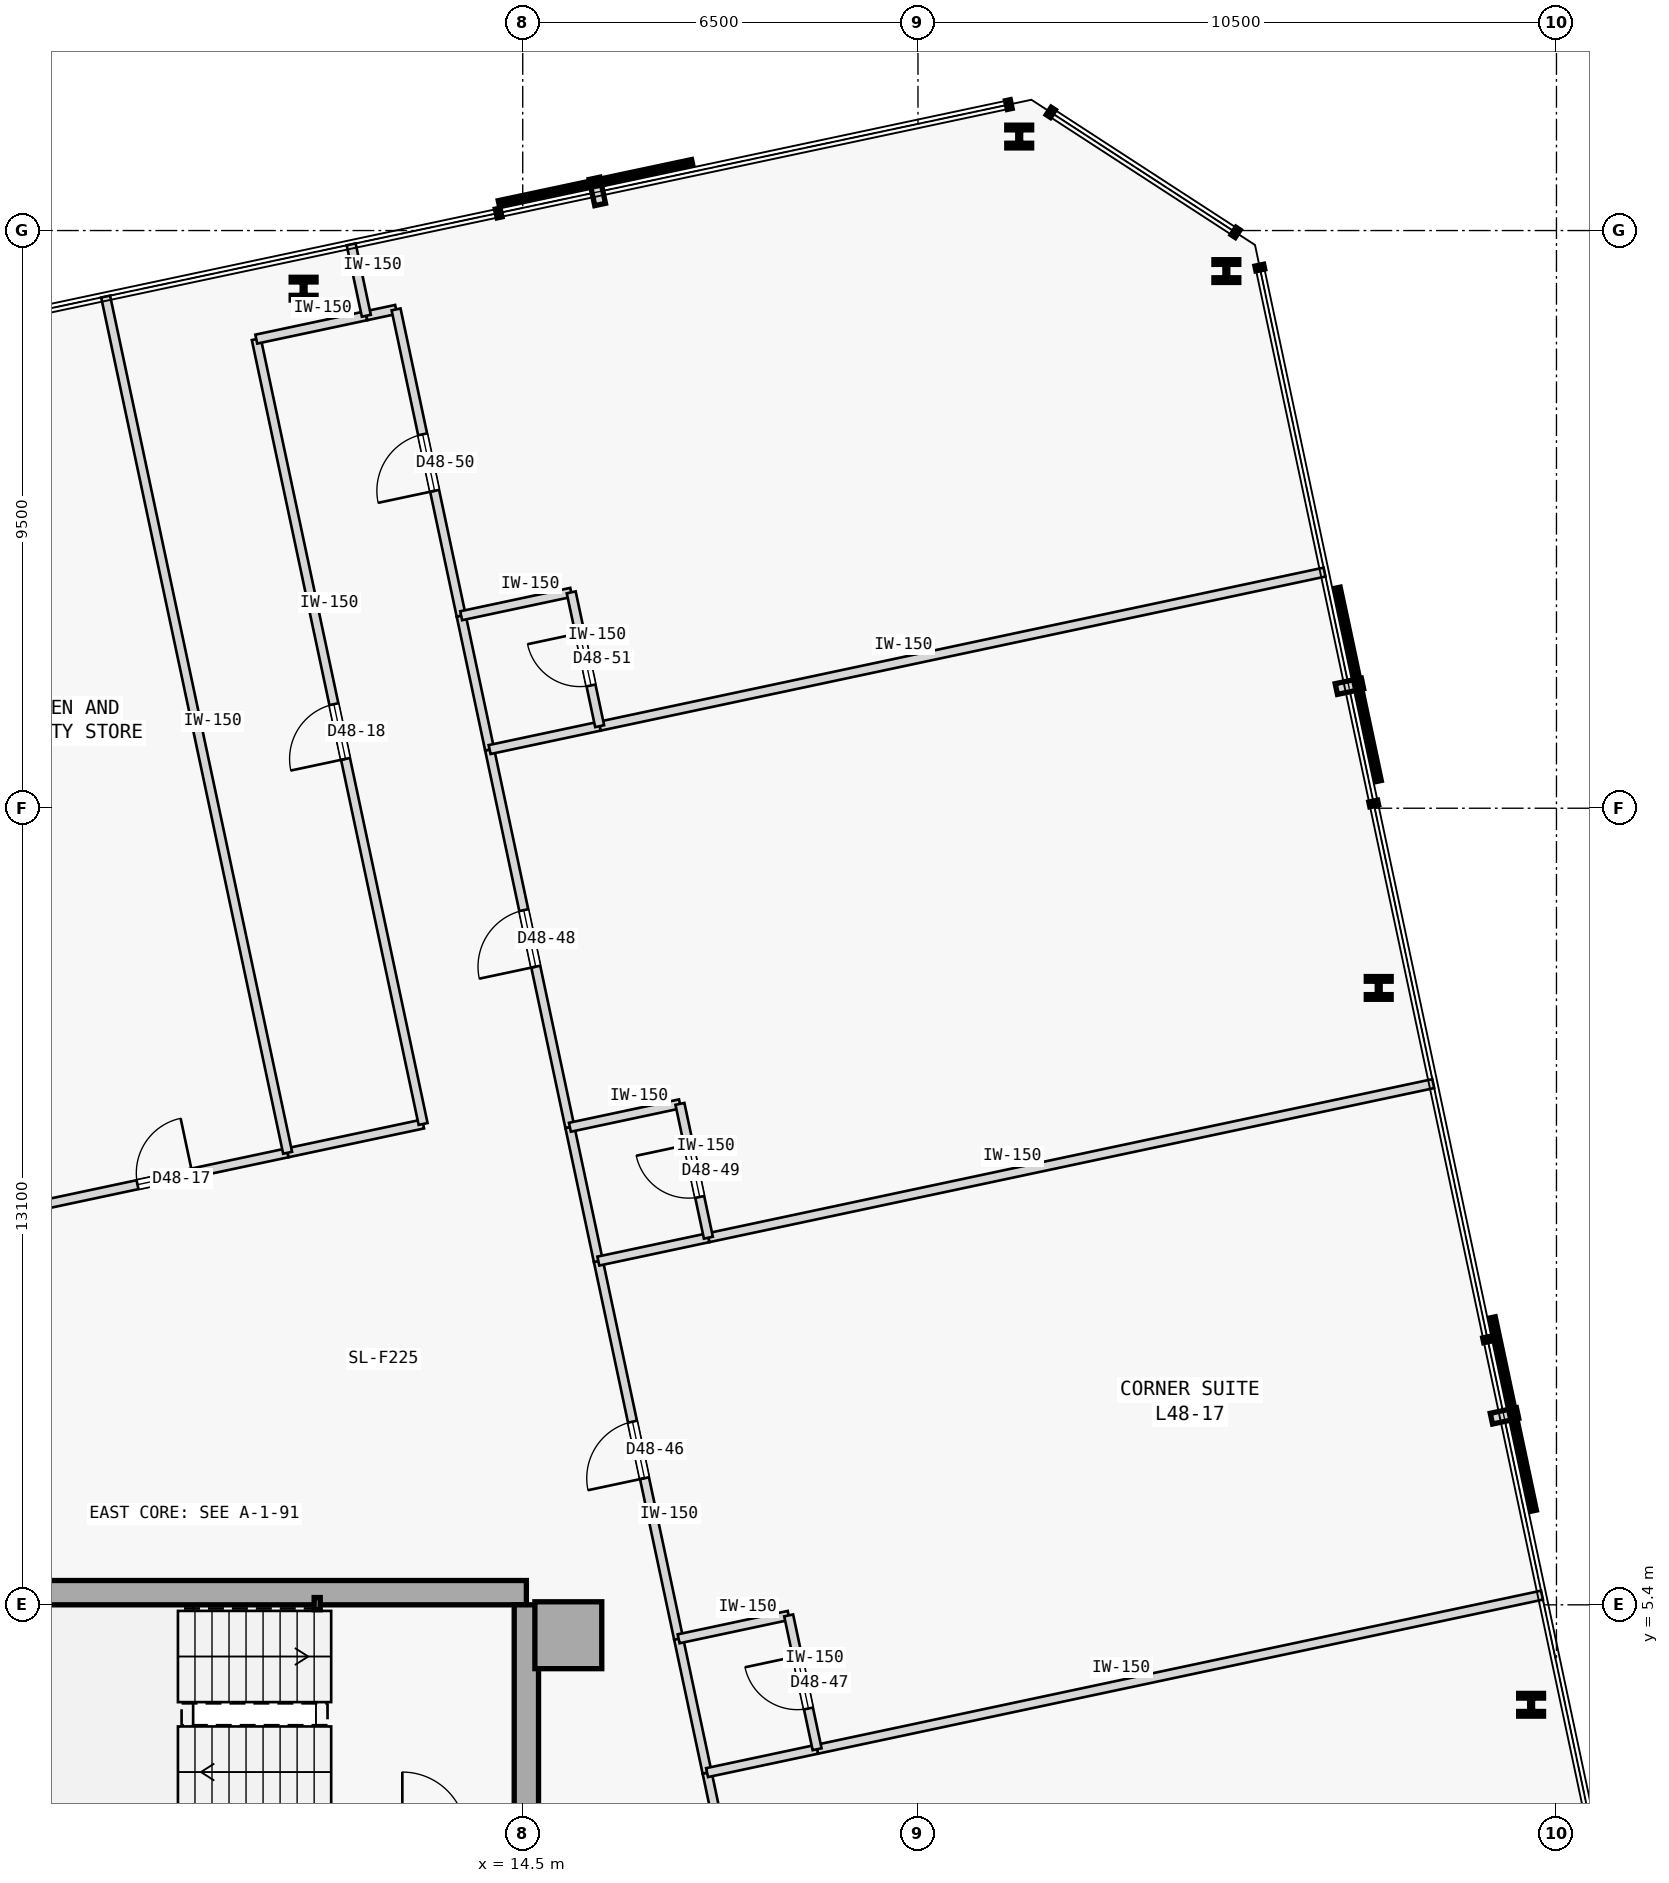
"""IFC4 building model, lengths in metres.
Left out: names, types, materials, properties, quantities, classifications, styles, units other than length and angle.
Written with IfcOpenShell. Run it as: python <this file> out.ifc"""

import sys

from ifc_helpers import new_model, si_unit, direction, frame, frame_2d, origin, origin_2d, place, context, subcontext, project, spatial, rectangle, hollow_rectangle, i_section, extrude, element, fill, save


model = new_model("IFC4")
c1 = context("Model", 3, precision=1e-05, world=origin(), true_north=direction((0.0, 1.0)))
c2 = subcontext(c1, "Body", "Model", "MODEL_VIEW")
j1 = project(units=[si_unit("LENGTHUNIT", "METRE"), si_unit("PLANEANGLEUNIT", "RADIAN")], contexts=[c1])
p1 = place(None, origin())
s1 = spatial("IfcSite", under=j1, at=p1, CompositionType="ELEMENT")
p2 = place(p1, origin())
s2 = spatial("IfcBuilding", under=s1, at=p2, CompositionType="ELEMENT")
p3 = place(p2, frame((0.0, 0.0, 185.4)))
s3 = spatial("IfcBuildingStorey", under=s2, at=p3, CompositionType="ELEMENT", Elevation=185.4)
p4 = place(p3, frame((15.25, 4.9, 0.0), z_axis=(0.0, 0.0, 1.0), x_axis=(1.0, 0.0, 0.0)))
e1 = element("IfcColumn", 1, at=p4, inside=s3, PredefinedType="COLUMN", context=c2, shape_type="SweptSolid", body=[
    extrude(rectangle(XDim=1.1, YDim=1.1, at=origin_2d()), origin(), (0.0, 0.0, 1.0), 3.4),
])
p5 = place(p3, frame((3.15, 5.6, 0.0), z_axis=(0.0, 0.0, 1.0), x_axis=(1.0, 0.0, 0.0)))
e2 = element("IfcWall", 2, at=p5, inside=s3, PredefinedType="SHEAR", context=c2, shape_type="SweptSolid", body=[
    extrude(rectangle(XDim=11.41, YDim=0.4, at=frame_2d((5.705, 0.0))), origin(), (0.0, 0.0, 1.0), 3.175),
])
p6 = place(p3, frame((14.56, -5.4, 0.0), z_axis=(0.0, 0.0, 1.0), x_axis=(0.0, 1.0, 0.0)))
e3 = element("IfcWall", 3, at=p6, inside=s3, PredefinedType="SHEAR", context=c2, shape_type="SweptSolid", body=[
    extrude(rectangle(XDim=10.8, YDim=0.4, at=frame_2d((5.4, 0.0))), origin(), (0.0, 0.0, 1.0), 3.175),
])
p7 = place(p3, frame((11.12, 5.42, 0.0), z_axis=(0.0, 0.0, 1.0), x_axis=(1.0, 0.0, 0.0)))
e4 = element("IfcColumn", 4, at=p7, inside=s3, PredefinedType="COLUMN", context=c2, shape_type="SweptSolid", body=[
    extrude(hollow_rectangle(XDim=0.1, YDim=0.2, WallThickness=0.008, at=origin_2d()), origin(), (0.0, 0.0, 1.0), 3.4),
])
for number, where, z_axis, x_axis in (
    (5, (31.083, 3.756, 0.0), (0.0, 0.0, 1.0), (1.0, 0.0, 0.0)),
    (6, (28.577, 15.545, 0.0), (0.0, 0.0, 1.0), (1.0, 0.0, 0.0)),
    (7, (26.071, 27.333, 0.0), (0.0, 0.0, 1.0), (1.0, 0.0, 0.0)),
    (8, (22.665, 29.546, 0.0), (0.0, 0.0, 1.0), (1.0, 0.0, 0.0)),
    (9, (10.896, 27.044, 0.0), (0.0, 0.0, 1.0), (1.0, 0.0, 0.0)),
):
    element("IfcColumn", number, at=place(p3, frame(where, z_axis=z_axis, x_axis=x_axis)), inside=s3, PredefinedType="COLUMN", context=c2, shape_type="SweptSolid", body=[
        extrude(i_section(OverallWidth=0.409, OverallDepth=0.374, WebThickness=0.048, FlangeThickness=0.077, FilletRadius=0.015, at=origin_2d()), origin(), (0.0, 0.0, 1.0), 3.4),
    ])
p8 = place(p3, frame((6.597, 11.976, 0.0), z_axis=(0.0, 0.0, 1.0), x_axis=(0.978155092113, 0.207876443525, 0.0)))
e10 = element("IfcWall", 10, at=p8, inside=s3, PredefinedType="PARTITIONING", context=c2, shape_type="SweptSolid", body=[
    extrude(rectangle(XDim=4.127, YDim=0.15, at=frame_2d((2.063, 0.0))), origin(), (0.0, 0.0, 1.0), 3.175),
])
p9 = place(p8, frame((1.604, 0.0, 0.0)))
e11 = element("IfcOpeningElement", 11, at=p9, cuts=e10, PredefinedType="OPENING", context=c2, shape_type="SweptSolid", body=[
    extrude(rectangle(XDim=0.92, YDim=2.15, at=frame_2d((0.46, 1.075))), frame((0.0, 0.085, 0.0), z_axis=(0.0, -1.0, 0.0), x_axis=(1.0, 0.0, 0.0)), (0.0, 0.0, 1.0), 0.17),
])
p10 = place(p3, frame((10.634, 12.834, 0.0), z_axis=(0.0, 0.0, 1.0), x_axis=(0.978147682212, 0.207911307493, 0.0)))
e12 = element("IfcWall", 12, at=p10, inside=s3, PredefinedType="PARTITIONING", context=c2, shape_type="SweptSolid", body=[
    extrude(rectangle(XDim=2.278, YDim=0.15, at=frame_2d((1.139, 0.0))), origin(), (0.0, 0.0, 1.0), 3.175),
])
p11 = place(p3, frame((12.862, 13.308, 0.0), z_axis=(0.0, 0.0, 1.0), x_axis=(-0.207911421929, 0.978147657888, 0.0)))
e13 = element("IfcWall", 13, at=p11, inside=s3, PredefinedType="PARTITIONING", context=c2, shape_type="SweptSolid", body=[
    extrude(rectangle(XDim=13.195, YDim=0.15, at=frame_2d((6.598, 0.0))), origin(), (0.0, 0.0, 1.0), 3.175),
])
p12 = place(p11, frame((6.137, 0.0, 0.0)))
e14 = element("IfcOpeningElement", 14, at=p12, cuts=e13, PredefinedType="OPENING", context=c2, shape_type="SweptSolid", body=[
    extrude(rectangle(XDim=0.92, YDim=2.15, at=frame_2d((0.46, 1.075))), frame((0.0, 0.085, 0.0), z_axis=(0.0, -1.0, 0.0), x_axis=(1.0, 0.0, 0.0)), (0.0, 0.0, 1.0), 0.17),
])
p13 = place(p3, frame((10.118, 26.214, 0.0), z_axis=(0.0, 0.0, 1.0), x_axis=(0.978133353907, 0.20797870558, 0.0)))
e15 = element("IfcWall", 15, at=p13, inside=s3, PredefinedType="PARTITIONING", context=c2, shape_type="SweptSolid", body=[
    extrude(rectangle(XDim=1.85, YDim=0.15, at=frame_2d((0.925, 0.0))), origin(), (0.0, 0.0, 1.0), 3.175),
])
p14 = place(p3, frame((18.852, -3.571, 0.0), z_axis=(0.0, 0.0, 1.0), x_axis=(-0.207879907349, 0.978154355979, 0.0)))
e16 = element("IfcWall", 16, at=p14, inside=s3, PredefinedType="PARTITIONING", context=c2, shape_type="SweptSolid", body=[
    extrude(rectangle(XDim=6.35, YDim=0.15, at=frame_2d((3.175, 0.0))), origin(), (0.0, 0.0, 1.0), 3.175),
])
p15 = place(p14, frame((2.7, 0.0, 0.0)))
e17 = element("IfcOpeningElement", 17, at=p15, cuts=e16, PredefinedType="OPENING", context=c2, shape_type="SweptSolid", body=[
    extrude(rectangle(XDim=0.95, YDim=2.15, at=frame_2d((0.475, 1.075))), frame((0.0, 0.085, 0.0), z_axis=(0.0, -1.0, 0.0), x_axis=(1.0, 0.0, 0.0)), (0.0, 0.0, 1.0), 0.17),
])
p16 = place(p3, frame((17.064, 4.841, 0.0), z_axis=(0.0, 0.0, 1.0), x_axis=(-0.207924511115, 0.978144875608, 0.0)))
e18 = element("IfcWall", 18, at=p16, inside=s3, PredefinedType="PARTITIONING", context=c2, shape_type="SweptSolid", body=[
    extrude(rectangle(XDim=6.35, YDim=0.15, at=frame_2d((3.175, 0.0))), origin(), (0.0, 0.0, 1.0), 3.175),
])
p17 = place(p16, frame((2.7, 0.0, 0.0)))
e19 = element("IfcOpeningElement", 19, at=p17, cuts=e18, PredefinedType="OPENING", context=c2, shape_type="SweptSolid", body=[
    extrude(rectangle(XDim=0.95, YDim=2.15, at=frame_2d((0.475, 1.075))), frame((0.0, 0.085, 0.0), z_axis=(0.0, -1.0, 0.0), x_axis=(1.0, 0.0, 0.0)), (0.0, 0.0, 1.0), 0.17),
])
p18 = place(p3, frame((17.532, 2.641, 0.0), z_axis=(0.0, 0.0, 1.0), x_axis=(-0.207913264065, 0.978147266328, 0.0)))
e20 = element("IfcWall", 20, at=p18, inside=s3, PredefinedType="PARTITIONING", context=c2, shape_type="SweptSolid", body=[
    extrude(rectangle(XDim=2.25, YDim=0.15, at=frame_2d((1.125, 0.0))), origin(), (0.0, 0.0, 1.0), 3.175),
])
p19 = place(p3, frame((15.276, 13.253, 0.0), z_axis=(0.0, 0.0, 1.0), x_axis=(-0.207924511115, 0.978144875608, 0.0)))
e21 = element("IfcWall", 21, at=p19, inside=s3, PredefinedType="PARTITIONING", context=c2, shape_type="SweptSolid", body=[
    extrude(rectangle(XDim=6.35, YDim=0.15, at=frame_2d((3.175, 0.0))), origin(), (0.0, 0.0, 1.0), 3.175),
])
p20 = place(p19, frame((2.7, 0.0, 0.0)))
e22 = element("IfcOpeningElement", 22, at=p20, cuts=e21, PredefinedType="OPENING", context=c2, shape_type="SweptSolid", body=[
    extrude(rectangle(XDim=0.95, YDim=2.15, at=frame_2d((0.475, 1.075))), frame((0.0, 0.085, 0.0), z_axis=(0.0, -1.0, 0.0), x_axis=(1.0, 0.0, 0.0)), (0.0, 0.0, 1.0), 0.17),
])
p21 = place(p3, frame((15.744, 11.052, 0.0), z_axis=(0.0, 0.0, 1.0), x_axis=(-0.207891197838, 0.978151956427, 0.0)))
e23 = element("IfcWall", 23, at=p21, inside=s3, PredefinedType="PARTITIONING", context=c2, shape_type="SweptSolid", body=[
    extrude(rectangle(XDim=2.25, YDim=0.15, at=frame_2d((1.125, 0.0))), origin(), (0.0, 0.0, 1.0), 3.175),
])
p22 = place(p3, frame((11.928, 26.599, 0.0), z_axis=(0.0, 0.0, 1.0), x_axis=(0.97822210712, 0.207560856478, 0.0)))
e24 = element("IfcWall", 24, at=p22, inside=s3, PredefinedType="PARTITIONING", context=c2, shape_type="SweptSolid", body=[
    extrude(rectangle(XDim=0.5, YDim=0.15, at=frame_2d((0.25, 0.0))), origin(), (0.0, 0.0, 1.0), 3.175),
])
p23 = place(p3, frame((13.488, 21.666, 0.0), z_axis=(0.0, 0.0, 1.0), x_axis=(-0.207926226209, 0.978144511028, 0.0)))
e25 = element("IfcWall", 25, at=p23, inside=s3, PredefinedType="PARTITIONING", context=c2, shape_type="SweptSolid", body=[
    extrude(rectangle(XDim=5.15, YDim=0.15, at=frame_2d((2.575, 0.0))), origin(), (0.0, 0.0, 1.0), 3.175),
])
p24 = place(p23, frame((2.1, 0.0, 0.0)))
e26 = element("IfcOpeningElement", 26, at=p24, cuts=e25, PredefinedType="OPENING", context=c2, shape_type="SweptSolid", body=[
    extrude(rectangle(XDim=0.95, YDim=2.15, at=frame_2d((0.475, 1.075))), frame((0.0, 0.085, 0.0), z_axis=(0.0, -1.0, 0.0), x_axis=(1.0, 0.0, 0.0)), (0.0, 0.0, 1.0), 0.17),
])
p25 = place(p3, frame((13.956, 19.465, 0.0), z_axis=(0.0, 0.0, 1.0), x_axis=(-0.207891197838, 0.978151956427, 0.0)))
e27 = element("IfcWall", 27, at=p25, inside=s3, PredefinedType="PARTITIONING", context=c2, shape_type="SweptSolid", body=[
    extrude(rectangle(XDim=2.25, YDim=0.15, at=frame_2d((1.125, 0.0))), origin(), (0.0, 0.0, 1.0), 3.175),
])
p26 = place(p3, frame((10.634, 12.834, 0.0), z_axis=(0.0, 0.0, 1.0), x_axis=(-0.207911899531, 0.97814755637, 0.0)))
e28 = element("IfcWall", 28, at=p26, inside=s3, PredefinedType="PARTITIONING", context=c2, shape_type="SweptSolid", body=[
    extrude(rectangle(XDim=14.395, YDim=0.15, at=frame_2d((7.198, 0.0))), origin(), (0.0, 0.0, 1.0), 3.175),
])
p27 = place(p3, frame((11.928, 26.599, 0.0), z_axis=(0.0, 0.0, 1.0), x_axis=(-0.20795853359, 0.978137642823, 0.0)))
e29 = element("IfcWall", 29, at=p27, inside=s3, PredefinedType="PARTITIONING", context=c2, shape_type="SweptSolid", body=[
    extrude(rectangle(XDim=1.2, YDim=0.15, at=frame_2d((0.6, 0.0))), origin(), (0.0, 0.0, 1.0), 3.175),
])
p28 = place(p3, frame((19.341, 3.025, 0.0), z_axis=(0.0, 0.0, 1.0), x_axis=(0.97814556055, 0.207921288896, 0.0)))
e30 = element("IfcWall", 30, at=p28, inside=s3, PredefinedType="PARTITIONING", context=c2, shape_type="SweptSolid", body=[
    extrude(rectangle(XDim=12.187, YDim=0.15, at=frame_2d((6.094, 0.0))), origin(), (0.0, 0.0, 1.0), 3.175),
])
p29 = place(p3, frame((17.532, 2.641, 0.0), z_axis=(0.0, 0.0, 1.0), x_axis=(0.978160192495, 0.207852442415, 0.0)))
e31 = element("IfcWall", 31, at=p29, inside=s3, PredefinedType="PARTITIONING", context=c2, shape_type="SweptSolid", body=[
    extrude(rectangle(XDim=1.85, YDim=0.15, at=frame_2d((0.925, 0.0))), origin(), (0.0, 0.0, 1.0), 3.175),
])
p30 = place(p3, frame((17.064, 4.841, 0.0), z_axis=(0.0, 0.0, 1.0), x_axis=(0.978133353907, 0.20797870558, 0.0)))
e32 = element("IfcWall", 32, at=p30, inside=s3, PredefinedType="PARTITIONING", context=c2, shape_type="SweptSolid", body=[
    extrude(rectangle(XDim=1.85, YDim=0.15, at=frame_2d((0.925, 0.0))), origin(), (0.0, 0.0, 1.0), 3.175),
])
p31 = place(p3, frame((19.341, 3.025, 0.0), z_axis=(0.0, 0.0, 1.0), x_axis=(-0.207891197838, 0.978151956427, 0.0)))
e33 = element("IfcWall", 33, at=p31, inside=s3, PredefinedType="PARTITIONING", context=c2, shape_type="SweptSolid", body=[
    extrude(rectangle(XDim=2.25, YDim=0.15, at=frame_2d((1.125, 0.0))), origin(), (0.0, 0.0, 1.0), 3.175),
])
p32 = place(p31, frame((0.685, 0.0, 0.0)))
e34 = element("IfcOpeningElement", 34, at=p32, cuts=e33, PredefinedType="OPENING", context=c2, shape_type="SweptSolid", body=[
    extrude(rectangle(XDim=0.88, YDim=2.15, at=frame_2d((0.44, 1.075))), frame((0.0, 0.085, 0.0), z_axis=(0.0, -1.0, 0.0), x_axis=(1.0, 0.0, 0.0)), (0.0, 0.0, 1.0), 0.17),
])
p33 = place(p3, frame((17.553, 11.437, 0.0), z_axis=(0.0, 0.0, 1.0), x_axis=(0.97814556055, 0.207921288896, 0.0)))
e35 = element("IfcWall", 35, at=p33, inside=s3, PredefinedType="PARTITIONING", context=c2, shape_type="SweptSolid", body=[
    extrude(rectangle(XDim=12.187, YDim=0.15, at=frame_2d((6.094, 0.0))), origin(), (0.0, 0.0, 1.0), 3.175),
])
for number, where, z_axis, x_axis in (
    (36, (15.744, 11.052, 0.0), (0.0, 0.0, 1.0), (0.978, 0.208, 0.0)),
    (37, (15.276, 13.253, 0.0), (0.0, 0.0, 1.0), (0.978, 0.208, 0.0)),
):
    element("IfcWall", number, at=place(p3, frame(where, z_axis=z_axis, x_axis=x_axis)), inside=s3, PredefinedType="PARTITIONING", context=c2, shape_type="SweptSolid", body=[
        extrude(rectangle(XDim=1.85, YDim=0.15, at=frame_2d((0.925, 0.0))), origin(), (0.0, 0.0, 1.0), 3.175),
    ])
p34 = place(p3, frame((17.553, 11.437, 0.0), z_axis=(0.0, 0.0, 1.0), x_axis=(-0.207891197838, 0.978151956427, 0.0)))
e38 = element("IfcWall", 38, at=p34, inside=s3, PredefinedType="PARTITIONING", context=c2, shape_type="SweptSolid", body=[
    extrude(rectangle(XDim=2.25, YDim=0.15, at=frame_2d((1.125, 0.0))), origin(), (0.0, 0.0, 1.0), 3.175),
])
p35 = place(p34, frame((0.685, 0.0, 0.0)))
e39 = element("IfcOpeningElement", 39, at=p35, cuts=e38, PredefinedType="OPENING", context=c2, shape_type="SweptSolid", body=[
    extrude(rectangle(XDim=0.88, YDim=2.15, at=frame_2d((0.44, 1.075))), frame((0.0, 0.085, 0.0), z_axis=(0.0, -1.0, 0.0), x_axis=(1.0, 0.0, 0.0)), (0.0, 0.0, 1.0), 0.17),
])
p36 = place(p3, frame((15.765, 19.849, 0.0), z_axis=(0.0, 0.0, 1.0), x_axis=(0.978149634612, 0.207902121941, 0.0)))
e40 = element("IfcWall", 40, at=p36, inside=s3, PredefinedType="PARTITIONING", context=c2, shape_type="SweptSolid", body=[
    extrude(rectangle(XDim=12.187, YDim=0.15, at=frame_2d((6.094, 0.0))), origin(), (0.0, 0.0, 1.0), 3.175),
])
for number, where, z_axis, x_axis in (
    (41, (13.956, 19.465, 0.0), (0.0, 0.0, 1.0), (0.978, 0.208, 0.0)),
    (42, (13.488, 21.666, 0.0), (0.0, 0.0, 1.0), (0.978, 0.208, 0.0)),
):
    element("IfcWall", number, at=place(p3, frame(where, z_axis=z_axis, x_axis=x_axis)), inside=s3, PredefinedType="PARTITIONING", context=c2, shape_type="SweptSolid", body=[
        extrude(rectangle(XDim=1.85, YDim=0.15, at=frame_2d((0.925, 0.0))), origin(), (0.0, 0.0, 1.0), 3.175),
    ])
p37 = place(p3, frame((15.765, 19.849, 0.0), z_axis=(0.0, 0.0, 1.0), x_axis=(-0.207891197838, 0.978151956427, 0.0)))
e43 = element("IfcWall", 43, at=p37, inside=s3, PredefinedType="PARTITIONING", context=c2, shape_type="SweptSolid", body=[
    extrude(rectangle(XDim=2.25, YDim=0.15, at=frame_2d((1.125, 0.0))), origin(), (0.0, 0.0, 1.0), 3.175),
])
p38 = place(p37, frame((0.685, 0.0, 0.0)))
e44 = element("IfcOpeningElement", 44, at=p38, cuts=e43, PredefinedType="OPENING", context=c2, shape_type="SweptSolid", body=[
    extrude(rectangle(XDim=0.88, YDim=2.15, at=frame_2d((0.44, 1.075))), frame((0.0, 0.085, 0.0), z_axis=(0.0, -1.0, 0.0), x_axis=(1.0, 0.0, 0.0)), (0.0, 0.0, 1.0), 0.17),
])
p39 = place(p9, origin())
e45 = element("IfcDoor", 45, at=p39, inside=s3, OperationType="SINGLE_SWING_RIGHT", PredefinedType="DOOR", context=c2, shape_type="SweptSolid", body=[
    extrude(rectangle(XDim=0.92, YDim=2.15, at=frame_2d((0.46, 1.075))), frame((0.0, 0.025, 0.0), z_axis=(0.0, -1.0, 0.0), x_axis=(1.0, 0.0, 0.0)), (0.0, 0.0, 1.0), 0.05),
])
fill(e11, e45)
p40 = place(p12, origin())
e46 = element("IfcDoor", 46, at=p40, inside=s3, OperationType="SINGLE_SWING_LEFT", PredefinedType="DOOR", context=c2, shape_type="SweptSolid", body=[
    extrude(rectangle(XDim=0.92, YDim=2.15, at=frame_2d((0.46, 1.075))), frame((0.0, 0.025, 0.0), z_axis=(0.0, -1.0, 0.0), x_axis=(1.0, 0.0, 0.0)), (0.0, 0.0, 1.0), 0.05),
])
fill(e14, e46)
p41 = place(p17, origin())
e47 = element("IfcDoor", 47, at=p41, inside=s3, OperationType="SINGLE_SWING_LEFT", PredefinedType="DOOR", context=c2, shape_type="SweptSolid", body=[
    extrude(rectangle(XDim=0.95, YDim=2.15, at=frame_2d((0.475, 1.075))), frame((0.0, 0.025, 0.0), z_axis=(0.0, -1.0, 0.0), x_axis=(1.0, 0.0, 0.0)), (0.0, 0.0, 1.0), 0.05),
])
fill(e19, e47)
p42 = place(p32, origin())
e48 = element("IfcDoor", 48, at=p42, inside=s3, OperationType="SINGLE_SWING_RIGHT", PredefinedType="DOOR", context=c2, shape_type="SweptSolid", body=[
    extrude(rectangle(XDim=0.88, YDim=2.15, at=frame_2d((0.44, 1.075))), frame((0.0, 0.025, 0.0), z_axis=(0.0, -1.0, 0.0), x_axis=(1.0, 0.0, 0.0)), (0.0, 0.0, 1.0), 0.05),
])
fill(e34, e48)
p43 = place(p20, origin())
e49 = element("IfcDoor", 49, at=p43, inside=s3, OperationType="SINGLE_SWING_LEFT", PredefinedType="DOOR", context=c2, shape_type="SweptSolid", body=[
    extrude(rectangle(XDim=0.95, YDim=2.15, at=frame_2d((0.475, 1.075))), frame((0.0, 0.025, 0.0), z_axis=(0.0, -1.0, 0.0), x_axis=(1.0, 0.0, 0.0)), (0.0, 0.0, 1.0), 0.05),
])
fill(e22, e49)
p44 = place(p35, origin())
e50 = element("IfcDoor", 50, at=p44, inside=s3, OperationType="SINGLE_SWING_RIGHT", PredefinedType="DOOR", context=c2, shape_type="SweptSolid", body=[
    extrude(rectangle(XDim=0.88, YDim=2.15, at=frame_2d((0.44, 1.075))), frame((0.0, 0.025, 0.0), z_axis=(0.0, -1.0, 0.0), x_axis=(1.0, 0.0, 0.0)), (0.0, 0.0, 1.0), 0.05),
])
fill(e39, e50)
p45 = place(p24, origin())
e51 = element("IfcDoor", 51, at=p45, inside=s3, OperationType="SINGLE_SWING_LEFT", PredefinedType="DOOR", context=c2, shape_type="SweptSolid", body=[
    extrude(rectangle(XDim=0.95, YDim=2.15, at=frame_2d((0.475, 1.075))), frame((0.0, 0.025, 0.0), z_axis=(0.0, -1.0, 0.0), x_axis=(1.0, 0.0, 0.0)), (0.0, 0.0, 1.0), 0.05),
])
fill(e26, e51)
p46 = place(p38, origin())
e52 = element("IfcDoor", 52, at=p46, inside=s3, OperationType="SINGLE_SWING_RIGHT", PredefinedType="DOOR", context=c2, shape_type="SweptSolid", body=[
    extrude(rectangle(XDim=0.88, YDim=2.15, at=frame_2d((0.44, 1.075))), frame((0.0, 0.025, 0.0), z_axis=(0.0, -1.0, 0.0), x_axis=(1.0, 0.0, 0.0)), (0.0, 0.0, 1.0), 0.05),
])
fill(e44, e52)
save(model, sys.argv[1])
